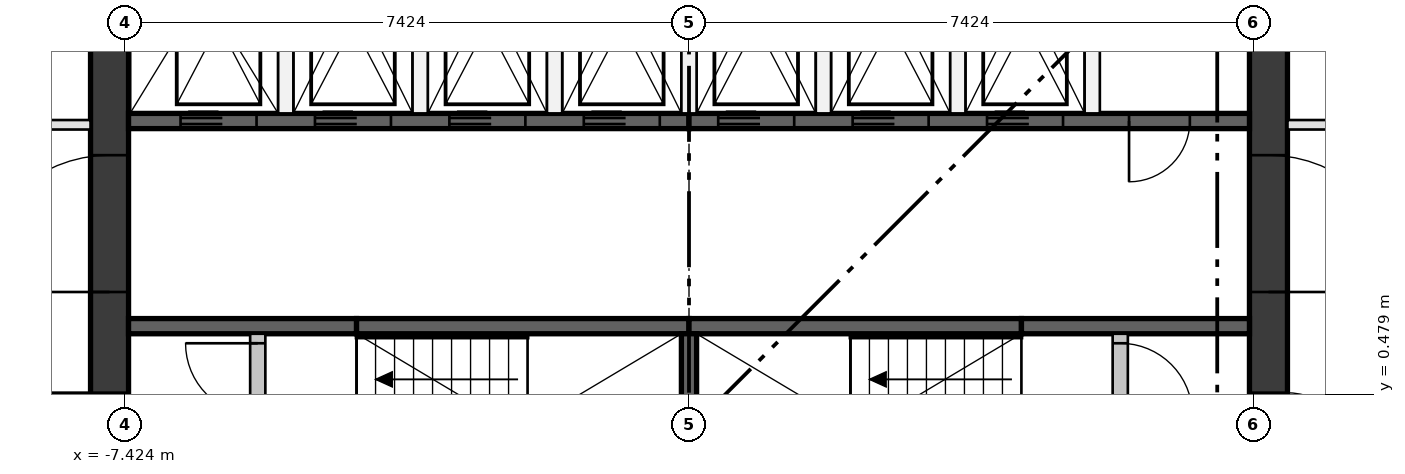
"""IFC4 building model, lengths in metres.
Left out: names, types, materials, properties, quantities, classifications, styles, units other than length and angle.
Written with IfcOpenShell. Run it as: python <this file> out.ifc"""

import sys

from ifc_helpers import new_model, si_unit, direction, frame, frame_2d, origin, place, context, subcontext, project, spatial, rectangle, extrude, element, fill, save


model = new_model("IFC4")
c1 = context("Model", 3, precision=1e-05, world=origin(), true_north=direction((0.0, 1.0)))
c2 = subcontext(c1, "Body", "Model", "MODEL_VIEW")
j1 = project(units=[si_unit("LENGTHUNIT", "METRE"), si_unit("PLANEANGLEUNIT", "RADIAN")], contexts=[c1])
p1 = place(None, origin())
s1 = spatial("IfcSite", under=j1, at=p1, CompositionType="ELEMENT")
p2 = place(p1, origin())
s2 = spatial("IfcBuilding", under=s1, at=p2, CompositionType="ELEMENT")
p3 = place(p2, frame((0.0, 0.0, 221.15)))
s3 = spatial("IfcBuildingStorey", under=s2, at=p3, CompositionType="ELEMENT", Elevation=221.15)
p4 = place(p3, frame((-7.624, -7.374, 0.0), z_axis=(0.0, 0.0, 1.0), x_axis=(0.0, 1.0, 0.0)))
e1 = element("IfcWall", 1, at=p4, inside=s3, PredefinedType="SHEAR", context=c2, shape_type="SweptSolid", body=[
    extrude(rectangle(XDim=14.748, YDim=0.5, at=frame_2d((7.374, 0.0))), origin(), (0.0, 0.0, 1.0), 3.35),
])
p5 = place(p4, frame((6.874, 0.0, 0.0)))
e2 = element("IfcOpeningElement", 2, at=p5, cuts=e1, PredefinedType="OPENING", context=c2, shape_type="SweptSolid", body=[
    extrude(rectangle(XDim=1.0, YDim=2.1, at=frame_2d((0.5, 1.05))), frame((0.0, 0.26, 0.0), z_axis=(0.0, -1.0, 0.0), x_axis=(1.0, 0.0, 0.0)), (0.0, 0.0, 1.0), 0.52),
])
p6 = place(p4, frame((3.75, 0.0, 0.0)))
e3 = element("IfcOpeningElement", 3, at=p6, cuts=e1, PredefinedType="OPENING", context=c2, shape_type="SweptSolid", body=[
    extrude(rectangle(XDim=1.8, YDim=2.1, at=frame_2d((0.9, 1.05))), frame((0.0, 0.26, 0.0), z_axis=(0.0, -1.0, 0.0), x_axis=(1.0, 0.0, 0.0)), (0.0, 0.0, 1.0), 0.52),
])
p7 = place(p4, frame((9.198, 0.0, 0.0)))
e4 = element("IfcOpeningElement", 4, at=p7, cuts=e1, PredefinedType="OPENING", context=c2, shape_type="SweptSolid", body=[
    extrude(rectangle(XDim=1.8, YDim=2.1, at=frame_2d((0.9, 1.05))), frame((0.0, 0.26, 0.0), z_axis=(0.0, -1.0, 0.0), x_axis=(1.0, 0.0, 0.0)), (0.0, 0.0, 1.0), 0.52),
])
p8 = place(p3, frame((7.624, -7.374, 0.0), z_axis=(0.0, 0.0, 1.0), x_axis=(0.0, 1.0, 0.0)))
e5 = element("IfcWall", 5, at=p8, inside=s3, PredefinedType="SHEAR", context=c2, shape_type="SweptSolid", body=[
    extrude(rectangle(XDim=14.748, YDim=0.5, at=frame_2d((7.374, 0.0))), origin(), (0.0, 0.0, 1.0), 3.35),
])
p9 = place(p8, frame((6.874, 0.0, 0.0)))
e6 = element("IfcOpeningElement", 6, at=p9, cuts=e5, PredefinedType="OPENING", context=c2, shape_type="SweptSolid", body=[
    extrude(rectangle(XDim=1.0, YDim=2.1, at=frame_2d((0.5, 1.05))), frame((0.0, 0.26, 0.0), z_axis=(0.0, -1.0, 0.0), x_axis=(1.0, 0.0, 0.0)), (0.0, 0.0, 1.0), 0.52),
])
p10 = place(p8, frame((3.75, 0.0, 0.0)))
e7 = element("IfcOpeningElement", 7, at=p10, cuts=e5, PredefinedType="OPENING", context=c2, shape_type="SweptSolid", body=[
    extrude(rectangle(XDim=1.8, YDim=2.1, at=frame_2d((0.9, 1.05))), frame((0.0, 0.26, 0.0), z_axis=(0.0, -1.0, 0.0), x_axis=(1.0, 0.0, 0.0)), (0.0, 0.0, 1.0), 0.52),
])
p11 = place(p8, frame((9.198, 0.0, 0.0)))
e8 = element("IfcOpeningElement", 8, at=p11, cuts=e5, PredefinedType="OPENING", context=c2, shape_type="SweptSolid", body=[
    extrude(rectangle(XDim=1.8, YDim=2.1, at=frame_2d((0.9, 1.05))), frame((0.0, 0.26, 0.0), z_axis=(0.0, -1.0, 0.0), x_axis=(1.0, 0.0, 0.0)), (0.0, 0.0, 1.0), 0.52),
])
p12 = place(p3, frame((-7.374, 4.074, 0.0), z_axis=(0.0, 0.0, 1.0), x_axis=(1.0, 0.0, 0.0)))
e9 = element("IfcWall", 9, at=p12, inside=s3, PredefinedType="SHEAR", context=c2, shape_type="SweptSolid", body=[
    extrude(rectangle(XDim=7.374, YDim=0.2, at=frame_2d((3.687, 0.0))), origin(), (0.0, 0.0, 1.0), 3.0),
])
p13 = place(p12, frame((0.684, 0.0, 0.0)))
e10 = element("IfcOpeningElement", 10, at=p13, cuts=e9, PredefinedType="OPENING", context=c2, shape_type="SweptSolid", body=[
    extrude(rectangle(XDim=1.0, YDim=2.1, at=frame_2d((0.5, 1.05))), frame((0.0, 0.11, 0.0), z_axis=(0.0, -1.0, 0.0), x_axis=(1.0, 0.0, 0.0)), (0.0, 0.0, 1.0), 0.22),
])
p14 = place(p12, frame((2.453, 0.0, 0.0)))
e11 = element("IfcOpeningElement", 11, at=p14, cuts=e9, PredefinedType="OPENING", context=c2, shape_type="SweptSolid", body=[
    extrude(rectangle(XDim=1.0, YDim=2.1, at=frame_2d((0.5, 1.05))), frame((0.0, 0.11, 0.0), z_axis=(0.0, -1.0, 0.0), x_axis=(1.0, 0.0, 0.0)), (0.0, 0.0, 1.0), 0.22),
])
p15 = place(p12, frame((4.221, 0.0, 0.0)))
e12 = element("IfcOpeningElement", 12, at=p15, cuts=e9, PredefinedType="OPENING", context=c2, shape_type="SweptSolid", body=[
    extrude(rectangle(XDim=1.0, YDim=2.1, at=frame_2d((0.5, 1.05))), frame((0.0, 0.11, 0.0), z_axis=(0.0, -1.0, 0.0), x_axis=(1.0, 0.0, 0.0)), (0.0, 0.0, 1.0), 0.22),
])
p16 = place(p12, frame((5.99, 0.0, 0.0)))
e13 = element("IfcOpeningElement", 13, at=p16, cuts=e9, PredefinedType="OPENING", context=c2, shape_type="SweptSolid", body=[
    extrude(rectangle(XDim=1.0, YDim=2.1, at=frame_2d((0.5, 1.05))), frame((0.0, 0.11, 0.0), z_axis=(0.0, -1.0, 0.0), x_axis=(1.0, 0.0, 0.0)), (0.0, 0.0, 1.0), 0.22),
])
p17 = place(p3, frame((0.0, 4.074, 0.0), z_axis=(0.0, 0.0, 1.0), x_axis=(1.0, 0.0, 0.0)))
e14 = element("IfcWall", 14, at=p17, inside=s3, PredefinedType="SHEAR", context=c2, shape_type="SweptSolid", body=[
    extrude(rectangle(XDim=7.374, YDim=0.2, at=frame_2d((3.687, 0.0))), origin(), (0.0, 0.0, 1.0), 3.0),
])
p18 = place(p17, frame((0.384, 0.0, 0.0)))
e15 = element("IfcOpeningElement", 15, at=p18, cuts=e14, PredefinedType="OPENING", context=c2, shape_type="SweptSolid", body=[
    extrude(rectangle(XDim=1.0, YDim=2.1, at=frame_2d((0.5, 1.05))), frame((0.0, 0.11, 0.0), z_axis=(0.0, -1.0, 0.0), x_axis=(1.0, 0.0, 0.0)), (0.0, 0.0, 1.0), 0.22),
])
p19 = place(p17, frame((2.153, 0.0, 0.0)))
e16 = element("IfcOpeningElement", 16, at=p19, cuts=e14, PredefinedType="OPENING", context=c2, shape_type="SweptSolid", body=[
    extrude(rectangle(XDim=1.0, YDim=2.1, at=frame_2d((0.5, 1.05))), frame((0.0, 0.11, 0.0), z_axis=(0.0, -1.0, 0.0), x_axis=(1.0, 0.0, 0.0)), (0.0, 0.0, 1.0), 0.22),
])
p20 = place(p17, frame((3.921, 0.0, 0.0)))
e17 = element("IfcOpeningElement", 17, at=p20, cuts=e14, PredefinedType="OPENING", context=c2, shape_type="SweptSolid", body=[
    extrude(rectangle(XDim=1.0, YDim=2.1, at=frame_2d((0.5, 1.05))), frame((0.0, 0.11, 0.0), z_axis=(0.0, -1.0, 0.0), x_axis=(1.0, 0.0, 0.0)), (0.0, 0.0, 1.0), 0.22),
])
p21 = place(p17, frame((5.79, 0.0, 0.0)))
e18 = element("IfcOpeningElement", 18, at=p21, cuts=e14, PredefinedType="OPENING", context=c2, shape_type="SweptSolid", body=[
    extrude(rectangle(XDim=0.8, YDim=2.1, at=frame_2d((0.4, 1.05))), frame((0.0, 0.11, 0.0), z_axis=(0.0, -1.0, 0.0), x_axis=(1.0, 0.0, 0.0)), (0.0, 0.0, 1.0), 0.22),
])
p22 = place(p3, frame((-7.374, 1.375, 0.0), z_axis=(0.0, 0.0, 1.0), x_axis=(1.0, 0.0, 0.0)))
e19 = element("IfcWall", 19, at=p22, inside=s3, PredefinedType="SHEAR", context=c2, shape_type="SweptSolid", body=[
    extrude(rectangle(XDim=3.0, YDim=0.2, at=frame_2d((1.5, 0.0))), origin(), (0.0, 0.0, 1.0), 3.0),
])
for number, where, z_axis, x_axis in (
    (20, (-4.374, 1.375, 0.0), (0.0, 0.0, 1.0), (1.0, 0.0, 0.0)),
    (21, (0.0, 1.375, 0.0), (0.0, 0.0, 1.0), (1.0, 0.0, 0.0)),
):
    element("IfcWall", number, at=place(p3, frame(where, z_axis=z_axis, x_axis=x_axis)), inside=s3, PredefinedType="SHEAR", context=c2, shape_type="SweptSolid", body=[
        extrude(rectangle(XDim=4.374, YDim=0.2, at=frame_2d((2.187, 0.0))), origin(), (0.0, 0.0, 1.0), 3.0),
    ])
p23 = place(p3, frame((4.374, 1.375, 0.0), z_axis=(0.0, 0.0, 1.0), x_axis=(1.0, 0.0, 0.0)))
e22 = element("IfcWall", 22, at=p23, inside=s3, PredefinedType="SHEAR", context=c2, shape_type="SweptSolid", body=[
    extrude(rectangle(XDim=3.0, YDim=0.2, at=frame_2d((1.5, 0.0))), origin(), (0.0, 0.0, 1.0), 3.0),
])
p24 = place(p3, frame((0.0, -1.275, 0.0), z_axis=(0.0, 0.0, 1.0), x_axis=(0.0, 1.0, 0.0)))
e23 = element("IfcWall", 23, at=p24, inside=s3, PredefinedType="SHEAR", context=c2, shape_type="SweptSolid", body=[
    extrude(rectangle(XDim=2.55, YDim=0.2, at=frame_2d((1.275, 0.0))), origin(), (0.0, 0.0, 1.0), 3.0),
])
for number, where, z_axis, x_axis in (
    (24, (-5.305, 4.174, 0.0), (0.0, 0.0, 1.0), (0.0, 1.0, 0.0)),
    (25, (-3.537, 4.174, 0.0), (0.0, 0.0, 1.0), (0.0, 1.0, 0.0)),
    (26, (-1.769, 4.174, 0.0), (0.0, 0.0, 1.0), (0.0, 1.0, 0.0)),
    (27, (0.0, 4.174, 0.0), (0.0, 0.0, 1.0), (0.0, 1.0, 0.0)),
    (28, (1.769, 4.174, 0.0), (0.0, 0.0, 1.0), (0.0, 1.0, 0.0)),
    (29, (3.537, 4.174, 0.0), (0.0, 0.0, 1.0), (0.0, 1.0, 0.0)),
    (30, (5.305, 4.174, 0.0), (0.0, 0.0, 1.0), (0.0, 1.0, 0.0)),
):
    element("IfcWall", number, at=place(p3, frame(where, z_axis=z_axis, x_axis=x_axis)), inside=s3, PredefinedType="PARTITIONING", context=c2, shape_type="SweptSolid", body=[
        extrude(rectangle(XDim=3.2, YDim=0.2, at=frame_2d((1.6, 0.0))), origin(), (0.0, 0.0, 1.0), 3.0),
    ])
p25 = place(p3, frame((-5.674, -1.275, 0.0), z_axis=(0.0, 0.0, 1.0), x_axis=(0.0, 1.0, 0.0)))
e31 = element("IfcWall", 31, at=p25, inside=s3, PredefinedType="PARTITIONING", context=c2, shape_type="SweptSolid", body=[
    extrude(rectangle(XDim=2.55, YDim=0.2, at=frame_2d((1.275, 0.0))), origin(), (0.0, 0.0, 1.0), 3.0),
])
p26 = place(p25, frame((0.125, 0.0, 0.0)))
e32 = element("IfcOpeningElement", 32, at=p26, cuts=e31, PredefinedType="OPENING", context=c2, shape_type="SweptSolid", body=[
    extrude(rectangle(XDim=0.95, YDim=2.1, at=frame_2d((0.475, 1.05))), frame((0.0, 0.11, 0.0), z_axis=(0.0, -1.0, 0.0), x_axis=(1.0, 0.0, 0.0)), (0.0, 0.0, 1.0), 0.22),
])
p27 = place(p25, frame((1.475, 0.0, 0.0)))
e33 = element("IfcOpeningElement", 33, at=p27, cuts=e31, PredefinedType="OPENING", context=c2, shape_type="SweptSolid", body=[
    extrude(rectangle(XDim=0.95, YDim=2.1, at=frame_2d((0.475, 1.05))), frame((0.0, 0.11, 0.0), z_axis=(0.0, -1.0, 0.0), x_axis=(1.0, 0.0, 0.0)), (0.0, 0.0, 1.0), 0.22),
])
p28 = place(p3, frame((5.674, -1.275, 0.0), z_axis=(0.0, 0.0, 1.0), x_axis=(0.0, 1.0, 0.0)))
e34 = element("IfcWall", 34, at=p28, inside=s3, PredefinedType="PARTITIONING", context=c2, shape_type="SweptSolid", body=[
    extrude(rectangle(XDim=2.55, YDim=0.2, at=frame_2d((1.275, 0.0))), origin(), (0.0, 0.0, 1.0), 3.0),
])
p29 = place(p28, frame((0.125, 0.0, 0.0)))
e35 = element("IfcOpeningElement", 35, at=p29, cuts=e34, PredefinedType="OPENING", context=c2, shape_type="SweptSolid", body=[
    extrude(rectangle(XDim=0.95, YDim=2.1, at=frame_2d((0.475, 1.05))), frame((0.0, 0.11, 0.0), z_axis=(0.0, -1.0, 0.0), x_axis=(1.0, 0.0, 0.0)), (0.0, 0.0, 1.0), 0.22),
])
p30 = place(p28, frame((1.475, 0.0, 0.0)))
e36 = element("IfcOpeningElement", 36, at=p30, cuts=e34, PredefinedType="OPENING", context=c2, shape_type="SweptSolid", body=[
    extrude(rectangle(XDim=0.95, YDim=2.1, at=frame_2d((0.475, 1.05))), frame((0.0, 0.11, 0.0), z_axis=(0.0, -1.0, 0.0), x_axis=(1.0, 0.0, 0.0)), (0.0, 0.0, 1.0), 0.22),
])
p31 = place(p3, frame((7.874, 4.024, 0.0), z_axis=(0.0, 0.0, 1.0), x_axis=(1.0, 0.0, 0.0)))
e37 = element("IfcWall", 37, at=p31, inside=s3, PredefinedType="PARTITIONING", context=c2, shape_type="SweptSolid", body=[
    extrude(rectangle(XDim=2.317, YDim=0.125, at=frame_2d((1.158, 0.0))), origin(), (0.0, 0.0, 1.0), 3.0),
])
p32 = place(p31, frame((0.7, 0.0, 0.0)))
e38 = element("IfcOpeningElement", 38, at=p32, cuts=e37, PredefinedType="OPENING", context=c2, shape_type="SweptSolid", body=[
    extrude(rectangle(XDim=1.0, YDim=2.1, at=frame_2d((0.5, 1.05))), frame((0.0, 0.073, 0.0), z_axis=(0.0, -1.0, 0.0), x_axis=(1.0, 0.0, 0.0)), (0.0, 0.0, 1.0), 0.145),
])
p33 = place(p3, frame((-10.296, 4.024, 0.0), z_axis=(0.0, 0.0, 1.0), x_axis=(1.0, 0.0, 0.0)))
e39 = element("IfcWall", 39, at=p33, inside=s3, PredefinedType="PARTITIONING", context=c2, shape_type="SweptSolid", body=[
    extrude(rectangle(XDim=2.422, YDim=0.125, at=frame_2d((1.211, 0.0))), origin(), (0.0, 0.0, 1.0), 3.0),
])
p34 = place(p33, frame((0.7, 0.0, 0.0)))
e40 = element("IfcOpeningElement", 40, at=p34, cuts=e39, PredefinedType="OPENING", context=c2, shape_type="SweptSolid", body=[
    extrude(rectangle(XDim=1.0, YDim=2.1, at=frame_2d((0.5, 1.05))), frame((0.0, 0.073, 0.0), z_axis=(0.0, -1.0, 0.0), x_axis=(1.0, 0.0, 0.0)), (0.0, 0.0, 1.0), 0.145),
])
p35 = place(p13, frame((1.0, 0.0, 0.0), z_axis=(0.0, 0.0, 1.0), x_axis=(-1.0, 0.0, 0.0)))
e41 = element("IfcDoor", 41, at=p35, inside=s3, OperationType="DOUBLE_DOOR_SLIDING", PredefinedType="DOOR", context=c2, shape_type="SweptSolid", body=[
    extrude(rectangle(XDim=1.0, YDim=2.1, at=frame_2d((0.5, 1.05))), frame((0.0, 0.025, 0.0), z_axis=(0.0, -1.0, 0.0), x_axis=(1.0, 0.0, 0.0)), (0.0, 0.0, 1.0), 0.05),
])
fill(e10, e41)
p36 = place(p14, frame((1.0, 0.0, 0.0), z_axis=(0.0, 0.0, 1.0), x_axis=(-1.0, 0.0, 0.0)))
e42 = element("IfcDoor", 42, at=p36, inside=s3, OperationType="DOUBLE_DOOR_SLIDING", PredefinedType="DOOR", context=c2, shape_type="SweptSolid", body=[
    extrude(rectangle(XDim=1.0, YDim=2.1, at=frame_2d((0.5, 1.05))), frame((0.0, 0.025, 0.0), z_axis=(0.0, -1.0, 0.0), x_axis=(1.0, 0.0, 0.0)), (0.0, 0.0, 1.0), 0.05),
])
fill(e11, e42)
p37 = place(p15, frame((1.0, 0.0, 0.0), z_axis=(0.0, 0.0, 1.0), x_axis=(-1.0, 0.0, 0.0)))
e43 = element("IfcDoor", 43, at=p37, inside=s3, OperationType="DOUBLE_DOOR_SLIDING", PredefinedType="DOOR", context=c2, shape_type="SweptSolid", body=[
    extrude(rectangle(XDim=1.0, YDim=2.1, at=frame_2d((0.5, 1.05))), frame((0.0, 0.025, 0.0), z_axis=(0.0, -1.0, 0.0), x_axis=(1.0, 0.0, 0.0)), (0.0, 0.0, 1.0), 0.05),
])
fill(e12, e43)
p38 = place(p16, frame((1.0, 0.0, 0.0), z_axis=(0.0, 0.0, 1.0), x_axis=(-1.0, 0.0, 0.0)))
e44 = element("IfcDoor", 44, at=p38, inside=s3, OperationType="DOUBLE_DOOR_SLIDING", PredefinedType="DOOR", context=c2, shape_type="SweptSolid", body=[
    extrude(rectangle(XDim=1.0, YDim=2.1, at=frame_2d((0.5, 1.05))), frame((0.0, 0.025, 0.0), z_axis=(0.0, -1.0, 0.0), x_axis=(1.0, 0.0, 0.0)), (0.0, 0.0, 1.0), 0.05),
])
fill(e13, e44)
p39 = place(p18, frame((1.0, 0.0, 0.0), z_axis=(0.0, 0.0, 1.0), x_axis=(-1.0, 0.0, 0.0)))
e45 = element("IfcDoor", 45, at=p39, inside=s3, OperationType="DOUBLE_DOOR_SLIDING", PredefinedType="DOOR", context=c2, shape_type="SweptSolid", body=[
    extrude(rectangle(XDim=1.0, YDim=2.1, at=frame_2d((0.5, 1.05))), frame((0.0, 0.025, 0.0), z_axis=(0.0, -1.0, 0.0), x_axis=(1.0, 0.0, 0.0)), (0.0, 0.0, 1.0), 0.05),
])
fill(e15, e45)
p40 = place(p19, frame((1.0, 0.0, 0.0), z_axis=(0.0, 0.0, 1.0), x_axis=(-1.0, 0.0, 0.0)))
e46 = element("IfcDoor", 46, at=p40, inside=s3, OperationType="DOUBLE_DOOR_SLIDING", PredefinedType="DOOR", context=c2, shape_type="SweptSolid", body=[
    extrude(rectangle(XDim=1.0, YDim=2.1, at=frame_2d((0.5, 1.05))), frame((0.0, 0.025, 0.0), z_axis=(0.0, -1.0, 0.0), x_axis=(1.0, 0.0, 0.0)), (0.0, 0.0, 1.0), 0.05),
])
fill(e16, e46)
p41 = place(p20, frame((1.0, 0.0, 0.0), z_axis=(0.0, 0.0, 1.0), x_axis=(-1.0, 0.0, 0.0)))
e47 = element("IfcDoor", 47, at=p41, inside=s3, OperationType="DOUBLE_DOOR_SLIDING", PredefinedType="DOOR", context=c2, shape_type="SweptSolid", body=[
    extrude(rectangle(XDim=1.0, YDim=2.1, at=frame_2d((0.5, 1.05))), frame((0.0, 0.025, 0.0), z_axis=(0.0, -1.0, 0.0), x_axis=(1.0, 0.0, 0.0)), (0.0, 0.0, 1.0), 0.05),
])
fill(e17, e47)
p42 = place(p27, origin())
e48 = element("IfcDoor", 48, at=p42, inside=s3, OperationType="SINGLE_SWING_RIGHT", PredefinedType="DOOR", context=c2, shape_type="SweptSolid", body=[
    extrude(rectangle(XDim=0.95, YDim=2.1, at=frame_2d((0.475, 1.05))), frame((0.0, 0.025, 0.0), z_axis=(0.0, -1.0, 0.0), x_axis=(1.0, 0.0, 0.0)), (0.0, 0.0, 1.0), 0.05),
])
fill(e33, e48)
p43 = place(p30, frame((0.95, 0.0, 0.0), z_axis=(0.0, 0.0, 1.0), x_axis=(-1.0, 0.0, 0.0)))
e49 = element("IfcDoor", 49, at=p43, inside=s3, OperationType="SINGLE_SWING_LEFT", PredefinedType="DOOR", context=c2, shape_type="SweptSolid", body=[
    extrude(rectangle(XDim=0.95, YDim=2.1, at=frame_2d((0.475, 1.05))), frame((0.0, 0.025, 0.0), z_axis=(0.0, -1.0, 0.0), x_axis=(1.0, 0.0, 0.0)), (0.0, 0.0, 1.0), 0.05),
])
fill(e36, e49)
p44 = place(p21, frame((0.8, 0.0, 0.0), z_axis=(0.0, 0.0, 1.0), x_axis=(-1.0, 0.0, 0.0)))
e50 = element("IfcDoor", 50, at=p44, inside=s3, OperationType="SINGLE_SWING_LEFT", PredefinedType="DOOR", context=c2, shape_type="SweptSolid", body=[
    extrude(rectangle(XDim=0.8, YDim=2.1, at=frame_2d((0.4, 1.05))), frame((0.0, 0.025, 0.0), z_axis=(0.0, -1.0, 0.0), x_axis=(1.0, 0.0, 0.0)), (0.0, 0.0, 1.0), 0.05),
])
fill(e18, e50)
p45 = place(p5, origin())
e51 = element("IfcDoor", 51, at=p45, inside=s3, OperationType="SINGLE_SWING_RIGHT", PredefinedType="DOOR", context=c2, shape_type="SweptSolid", body=[
    extrude(rectangle(XDim=1.0, YDim=2.1, at=frame_2d((0.5, 1.05))), frame((0.0, 0.25, 0.0), z_axis=(0.0, -1.0, 0.0), x_axis=(1.0, 0.0, 0.0)), (0.0, 0.0, 1.0), 0.05),
])
fill(e2, e51)
p46 = place(p7, origin())
e52 = element("IfcDoor", 52, at=p46, inside=s3, OperationType="DOUBLE_DOOR_SINGLE_SWING", PredefinedType="DOOR", context=c2, shape_type="SweptSolid", body=[
    extrude(rectangle(XDim=1.8, YDim=2.1, at=frame_2d((0.9, 1.05))), frame((0.0, 0.025, 0.0), z_axis=(0.0, -1.0, 0.0), x_axis=(1.0, 0.0, 0.0)), (0.0, 0.0, 1.0), 0.05),
])
fill(e4, e52)
p47 = place(p9, frame((1.0, 0.0, 0.0), z_axis=(0.0, 0.0, 1.0), x_axis=(-1.0, 0.0, 0.0)))
e53 = element("IfcDoor", 53, at=p47, inside=s3, OperationType="SINGLE_SWING_LEFT", PredefinedType="DOOR", context=c2, shape_type="SweptSolid", body=[
    extrude(rectangle(XDim=1.0, YDim=2.1, at=frame_2d((0.5, 1.05))), frame((0.0, 0.25, 0.0), z_axis=(0.0, -1.0, 0.0), x_axis=(1.0, 0.0, 0.0)), (0.0, 0.0, 1.0), 0.05),
])
fill(e6, e53)
p48 = place(p11, frame((1.8, 0.0, 0.0), z_axis=(0.0, 0.0, 1.0), x_axis=(-1.0, 0.0, 0.0)))
e54 = element("IfcDoor", 54, at=p48, inside=s3, OperationType="DOUBLE_DOOR_SINGLE_SWING", PredefinedType="DOOR", context=c2, shape_type="SweptSolid", body=[
    extrude(rectangle(XDim=1.8, YDim=2.1, at=frame_2d((0.9, 1.05))), frame((0.0, 0.025, 0.0), z_axis=(0.0, -1.0, 0.0), x_axis=(1.0, 0.0, 0.0)), (0.0, 0.0, 1.0), 0.05),
])
fill(e8, e54)
save(model, sys.argv[1])
